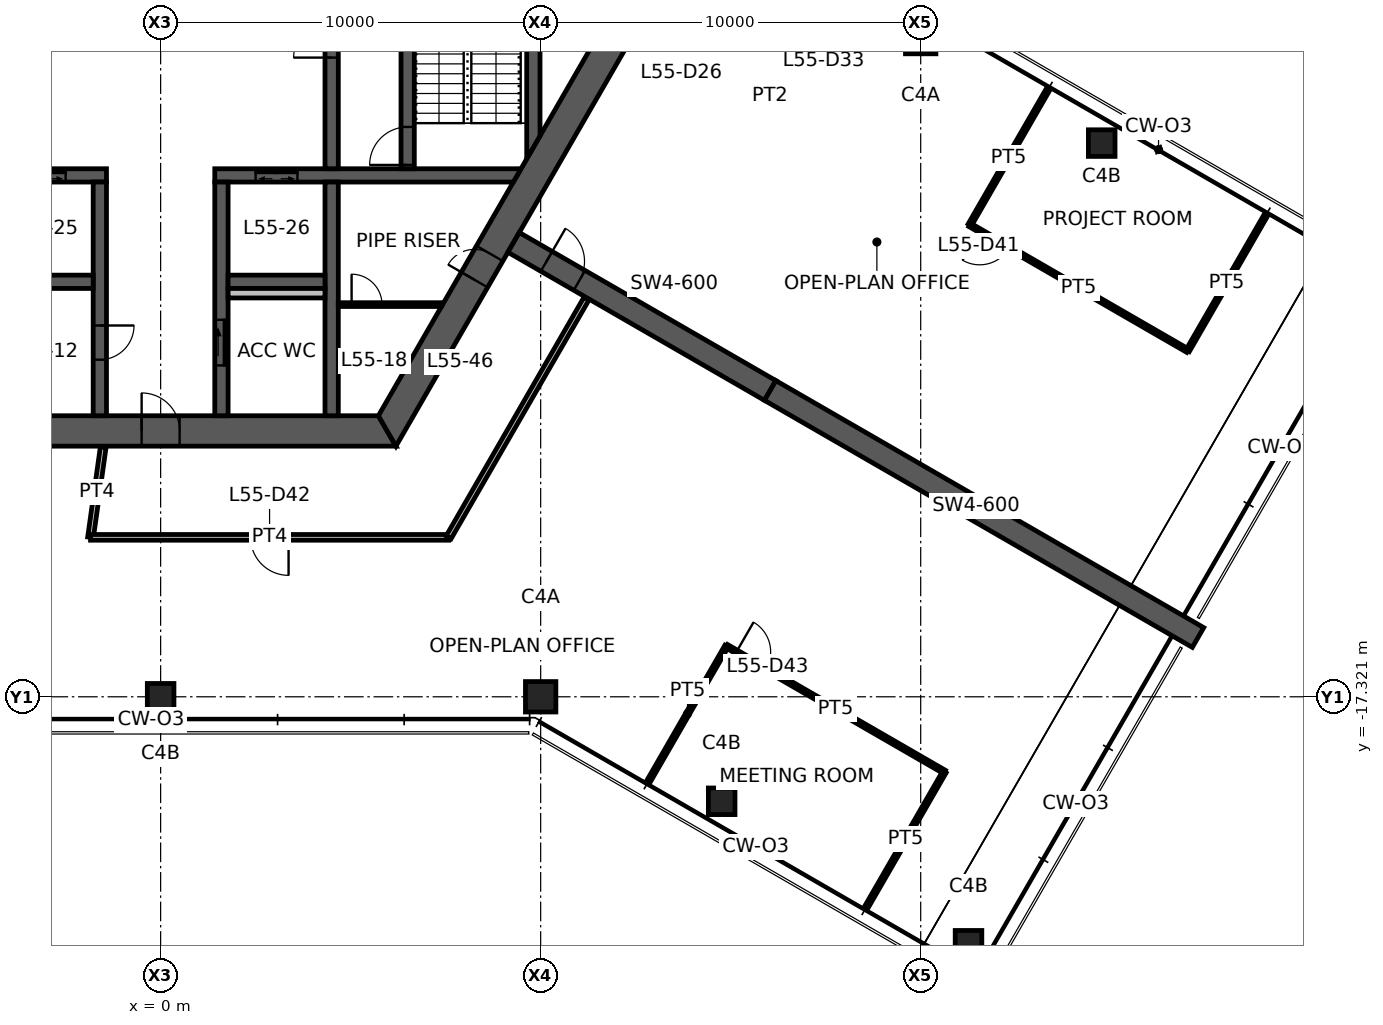
"""IFC4 building model, lengths in metres.
Left out: names, types, materials, properties, quantities, classifications, styles, units other than length and angle.
Written with IfcOpenShell. Run it as: python <this file> out.ifc"""

import sys

from ifc_helpers import new_model, si_unit, direction, frame, frame_2d, origin, origin_2d, place, context, subcontext, project, spatial, polyline, rectangle, hollow_rectangle, outline, extrude, element, fill, save


model = new_model("IFC4")
c1 = context("Model", 3, precision=1e-05, world=origin(), true_north=direction((0.0, 1.0)))
c2 = subcontext(c1, "Body", "Model", "MODEL_VIEW")
j1 = project(units=[si_unit("LENGTHUNIT", "METRE"), si_unit("PLANEANGLEUNIT", "RADIAN")], contexts=[c1])
p1 = place(None, origin())
s1 = spatial("IfcSite", under=j1, at=p1, CompositionType="ELEMENT")
p2 = place(p1, origin())
s2 = spatial("IfcBuilding", under=s1, at=p2, CompositionType="ELEMENT")
p3 = place(p2, frame((0.0, 0.0, 220.6)))
s3 = spatial("IfcBuildingStorey", under=s2, at=p3, CompositionType="ELEMENT", Elevation=220.6)
for number, where, z_axis, x_axis in (
    (1, (20.0, 0.0, 0.0), (0.0, 0.0, 1.0), (1.0, 0.0, 0.0)),
    (2, (10.0, -17.321, 0.0), (0.0, 0.0, 1.0), (1.0, 0.0, 0.0)),
):
    element("IfcColumn", number, at=place(p3, frame(where, z_axis=z_axis, x_axis=x_axis)), inside=s3, PredefinedType="COLUMN", context=c2, shape_type="SweptSolid", body=[
        extrude(hollow_rectangle(XDim=0.8, YDim=0.8, WallThickness=0.04, at=origin_2d()), origin(), (0.0, 0.0, 1.0), 3.9),
    ])
for number, where, z_axis, x_axis in (
    (3, (0.0, -17.321, 0.0), (0.0, 0.0, 1.0), (1.0, 0.0, 0.0)),
    (4, (14.763, -20.071, 0.0), (0.0, 0.0, 1.0), (1.0, 0.0, 0.0)),
    (5, (21.258, -23.821, 0.0), (0.0, 0.0, 1.0), (1.0, 0.0, 0.0)),
    (6, (24.763, -2.75, 0.0), (0.0, 0.0, 1.0), (1.0, 0.0, 0.0)),
):
    element("IfcColumn", number, at=place(p3, frame(where, z_axis=z_axis, x_axis=x_axis)), inside=s3, PredefinedType="COLUMN", context=c2, shape_type="SweptSolid", body=[
        extrude(hollow_rectangle(XDim=0.7, YDim=0.7, WallThickness=0.032, at=origin_2d()), origin(), (0.0, 0.0, 1.0), 3.9),
    ])
p4 = place(p3, frame((-5.961, -10.325, 0.0), z_axis=(0.0, 0.0, 1.0), x_axis=(1.0, 0.0, 0.0)))
e7 = element("IfcWall", 7, at=p4, inside=s3, PredefinedType="SHEAR", context=c2, shape_type="SweptSolid", body=[
    extrude(outline(polyline([(-0.231, -0.4), (5.461, -0.4), (6.461, -0.4), (12.153, -0.4), (11.691, 0.4), (6.461, 0.4), (5.461, 0.4), (0.231, 0.4), (-0.231, -0.4)])), origin(), (0.0, 0.0, 1.0), 3.9),
])
p5 = place(p4, frame((5.461, 0.0, 0.0)))
e8 = element("IfcOpeningElement", 8, at=p5, cuts=e7, PredefinedType="OPENING", context=c2, shape_type="SweptSolid", body=[
    extrude(rectangle(XDim=1.0, YDim=2.1, at=frame_2d((0.5, 1.05))), frame((0.0, 0.41, 0.0), z_axis=(0.0, -1.0, 0.0), x_axis=(1.0, 0.0, 0.0)), (0.0, 0.0, 1.0), 0.82),
])
p6 = place(p3, frame((5.961, -10.325, 0.0), z_axis=(0.0, 0.0, 1.0), x_axis=(0.500004296715, 0.866022923061, 0.0)))
e9 = element("IfcWall", 9, at=p6, inside=s3, PredefinedType="SHEAR", context=c2, shape_type="SweptSolid", body=[
    extrude(outline(polyline([(-0.231, -0.4), (4.594, -0.4), (5.394, -0.4), (12.153, -0.4), (11.691, 0.4), (5.394, 0.4), (4.594, 0.4), (0.231, 0.4), (-0.231, -0.4)])), origin(), (0.0, 0.0, 1.0), 3.9),
])
p7 = place(p6, frame((4.594, 0.0, 0.0)))
e10 = element("IfcOpeningElement", 10, at=p7, cuts=e9, PredefinedType="OPENING", context=c2, shape_type="SweptSolid", body=[
    extrude(rectangle(XDim=0.8, YDim=2.1, at=frame_2d((0.4, 1.05))), frame((0.0, 0.41, 0.0), z_axis=(0.0, -1.0, 0.0), x_axis=(1.0, 0.0, 0.0)), (0.0, 0.0, 1.0), 0.82),
])
p8 = place(p3, frame((9.288, -5.363, 0.0), z_axis=(0.0, 0.0, 1.0), x_axis=(0.866031736626, -0.499989031036, 0.0)))
e11 = element("IfcWall", 11, at=p8, inside=s3, PredefinedType="SHEAR", context=c2, shape_type="SweptSolid", body=[
    extrude(rectangle(XDim=7.796, YDim=0.6, at=frame_2d((3.898, 0.0))), origin(), (0.0, 0.0, 1.0), 3.9),
])
p9 = place(p8, frame((1.0, 0.0, 0.0)))
e12 = element("IfcOpeningElement", 12, at=p9, cuts=e11, PredefinedType="OPENING", context=c2, shape_type="SweptSolid", body=[
    extrude(rectangle(XDim=1.0, YDim=2.1, at=frame_2d((0.5, 1.05))), frame((0.0, 0.31, 0.0), z_axis=(0.0, -1.0, 0.0), x_axis=(1.0, 0.0, 0.0)), (0.0, 0.0, 1.0), 0.62),
])
p10 = place(p3, frame((16.039, -9.26, 0.0), z_axis=(0.0, 0.0, 1.0), x_axis=(0.866024837091, -0.50000098154, 0.0)))
e13 = element("IfcWall", 13, at=p10, inside=s3, PredefinedType="SHEAR", context=c2, shape_type="SweptSolid", body=[
    extrude(rectangle(XDim=13.0, YDim=0.6, at=frame_2d((6.5, 0.0))), origin(), (0.0, 0.0, 1.0), 3.9),
])
p11 = place(p3, frame((-9.382, -3.6, 0.0), z_axis=(0.0, 0.0, 1.0), x_axis=(1.0, 0.0, 0.0)))
e14 = element("IfcWall", 14, at=p11, inside=s3, PredefinedType="SHEAR", context=c2, shape_type="SweptSolid", body=[
    extrude(outline(polyline([(0.101, -0.175), (3.232, -0.175), (4.532, -0.175), (5.782, -0.175), (6.882, -0.175), (7.957, -0.175), (7.957, 0.175), (6.882, 0.175), (5.782, 0.175), (4.532, 0.175), (3.232, 0.175), (-0.101, 0.175), (0.101, -0.175)])), origin(), (0.0, 0.0, 1.0), 3.9),
])
p12 = place(p11, frame((5.782, 0.0, 0.0)))
e15 = element("IfcOpeningElement", 15, at=p12, cuts=e14, PredefinedType="OPENING", context=c2, shape_type="SweptSolid", body=[
    extrude(rectangle(XDim=1.1, YDim=2.1, at=frame_2d((0.55, 1.05))), frame((0.0, 0.185, 0.0), z_axis=(0.0, -1.0, 0.0), x_axis=(1.0, 0.0, 0.0)), (0.0, 0.0, 1.0), 0.37),
])
p13 = place(p11, frame((3.232, 0.0, 0.0)))
e16 = element("IfcOpeningElement", 16, at=p13, cuts=e14, PredefinedType="OPENING", context=c2, shape_type="SweptSolid", body=[
    extrude(rectangle(XDim=1.3, YDim=2.1, at=frame_2d((0.65, 1.05))), frame((0.0, 0.185, 0.0), z_axis=(0.0, -1.0, 0.0), x_axis=(1.0, 0.0, 0.0)), (0.0, 0.0, 1.0), 0.37),
])
p14 = place(p3, frame((1.425, -3.6, 0.0), z_axis=(0.0, 0.0, 1.0), x_axis=(1.0, 0.0, 0.0)))
e17 = element("IfcWall", 17, at=p14, inside=s3, PredefinedType="SHEAR", context=c2, shape_type="SweptSolid", body=[
    extrude(outline(polyline([(0.0, -0.175), (1.075, -0.175), (2.175, -0.175), (7.856, -0.175), (8.058, 0.175), (2.175, 0.175), (1.075, 0.175), (0.0, 0.175), (0.0, -0.175)])), origin(), (0.0, 0.0, 1.0), 3.9),
])
p15 = place(p14, frame((1.075, 0.0, 0.0)))
e18 = element("IfcOpeningElement", 18, at=p15, cuts=e17, PredefinedType="OPENING", context=c2, shape_type="SweptSolid", body=[
    extrude(rectangle(XDim=1.1, YDim=2.1, at=frame_2d((0.55, 1.05))), frame((0.0, 0.185, 0.0), z_axis=(0.0, -1.0, 0.0), x_axis=(1.0, 0.0, 0.0)), (0.0, 0.0, 1.0), 0.37),
])
p16 = place(p3, frame((-1.6, -3.775, 0.0), z_axis=(0.0, 0.0, 1.0), x_axis=(0.0, -1.0, 0.0)))
e19 = element("IfcWall", 19, at=p16, inside=s3, PredefinedType="SHEAR", context=c2, shape_type="SweptSolid", body=[
    extrude(rectangle(XDim=6.15, YDim=0.35, at=frame_2d((3.075, 0.0))), origin(), (0.0, 0.0, 1.0), 3.9),
])
p17 = place(p16, frame((3.775, 0.0, 0.0)))
e20 = element("IfcOpeningElement", 20, at=p17, cuts=e19, PredefinedType="OPENING", context=c2, shape_type="SweptSolid", body=[
    extrude(rectangle(XDim=0.9, YDim=2.1, at=frame_2d((0.45, 1.05))), frame((0.0, 0.185, 0.0), z_axis=(0.0, -1.0, 0.0), x_axis=(1.0, 0.0, 0.0)), (0.0, 0.0, 1.0), 0.37),
])
p18 = place(p3, frame((1.6, -3.775, 0.0), z_axis=(0.0, 0.0, 1.0), x_axis=(0.0, -1.0, 0.0)))
e21 = element("IfcWall", 21, at=p18, inside=s3, PredefinedType="SHEAR", context=c2, shape_type="SweptSolid", body=[
    extrude(rectangle(XDim=6.15, YDim=0.35, at=frame_2d((3.075, 0.0))), origin(), (0.0, 0.0, 1.0), 3.9),
])
p19 = place(p18, frame((3.625, 0.0, 0.0)))
e22 = element("IfcOpeningElement", 22, at=p19, cuts=e21, PredefinedType="OPENING", context=c2, shape_type="SweptSolid", body=[
    extrude(rectangle(XDim=1.2, YDim=2.1, at=frame_2d((0.6, 1.05))), frame((0.0, 0.185, 0.0), z_axis=(0.0, -1.0, 0.0), x_axis=(1.0, 0.0, 0.0)), (0.0, 0.0, 1.0), 0.37),
])
p20 = place(p3, frame((4.5, -3.425, 0.0), z_axis=(0.0, 0.0, 1.0), x_axis=(0.0, 1.0, 0.0)))
e23 = element("IfcWall", 23, at=p20, inside=s3, PredefinedType="SHEAR", context=c2, shape_type="SweptSolid", body=[
    extrude(rectangle(XDim=6.85, YDim=0.35, at=frame_2d((3.425, 0.0))), origin(), (0.0, 0.0, 1.0), 3.9),
])
p21 = place(p20, frame((2.925, 0.0, 0.0)))
e24 = element("IfcOpeningElement", 24, at=p21, cuts=e23, PredefinedType="OPENING", context=c2, shape_type="SweptSolid", body=[
    extrude(rectangle(XDim=1.0, YDim=2.1, at=frame_2d((0.5, 1.05))), frame((0.0, 0.185, 0.0), z_axis=(0.0, -1.0, 0.0), x_axis=(1.0, 0.0, 0.0)), (0.0, 0.0, 1.0), 0.37),
])
p22 = place(p3, frame((6.5, -3.425, 0.0), z_axis=(0.0, 0.0, 1.0), x_axis=(0.0, 1.0, 0.0)))
e25 = element("IfcWall", 25, at=p22, inside=s3, PredefinedType="SHEAR", context=c2, shape_type="SweptSolid", body=[
    extrude(rectangle(XDim=6.85, YDim=0.35, at=frame_2d((3.425, 0.0))), origin(), (0.0, 0.0, 1.0), 3.9),
])
p23 = place(p22, frame((0.1, 0.0, 0.0)))
e26 = element("IfcOpeningElement", 26, at=p23, cuts=e25, PredefinedType="OPENING", context=c2, shape_type="SweptSolid", body=[
    extrude(rectangle(XDim=1.0, YDim=2.1, at=frame_2d((0.5, 1.05))), frame((0.0, 0.185, 0.0), z_axis=(0.0, -1.0, 0.0), x_axis=(1.0, 0.0, 0.0)), (0.0, 0.0, 1.0), 0.37),
])
p24 = place(p3, frame((4.5, -3.775, 0.0), z_axis=(0.0, 0.0, 1.0), x_axis=(0.0, -1.0, 0.0)))
e27 = element("IfcWall", 27, at=p24, inside=s3, PredefinedType="SHEAR", context=c2, shape_type="SweptSolid", body=[
    extrude(rectangle(XDim=6.15, YDim=0.35, at=frame_2d((3.075, 0.0))), origin(), (0.0, 0.0, 1.0), 3.9),
])
for number, where, z_axis, x_axis in (
    (28, (-4.325, -6.4, 0.0), (0.0, 0.0, 1.0), (1.0, 0.0, 0.0)),
    (29, (1.775, -6.4, 0.0), (0.0, 0.0, 1.0), (1.0, 0.0, 0.0)),
):
    element("IfcWall", number, at=place(p3, frame(where, z_axis=z_axis, x_axis=x_axis)), inside=s3, PredefinedType="SHEAR", context=c2, shape_type="SweptSolid", body=[
        extrude(rectangle(XDim=2.55, YDim=0.35, at=frame_2d((1.275, 0.0))), origin(), (0.0, 0.0, 1.0), 3.9),
    ])
p25 = place(p3, frame((9.808, -2.862, 0.0), z_axis=(0.0, 0.0, 1.0), x_axis=(0.0, 1.0, 0.0)))
e30 = element("IfcWall", 30, at=p25, inside=s3, PredefinedType="SHEAR", context=c2, shape_type="SweptSolid", body=[
    extrude(outline(polyline([(0.303, -0.175), (5.421, -0.175), (6.028, 0.175), (-0.303, 0.175), (0.303, -0.175)])), origin(), (0.0, 0.0, 1.0), 3.9),
])
p26 = place(p3, frame((1.775, -6.7, 0.0), z_axis=(0.0, 0.0, 1.0), x_axis=(1.0, 0.0, 0.0)))
e31 = element("IfcWall", 31, at=p26, inside=s3, PredefinedType="PLUMBINGWALL", context=c2, shape_type="SweptSolid", body=[
    extrude(rectangle(XDim=2.55, YDim=0.25, at=frame_2d((1.275, 0.0))), origin(), (0.0, 0.0, 1.0), 3.9),
])
p27 = place(p3, frame((4.675, -7.0, 0.0), z_axis=(0.0, 0.0, 1.0), x_axis=(1.0, 0.0, 0.0)))
e32 = element("IfcWall", 32, at=p27, inside=s3, PredefinedType="PARTITIONING", context=c2, shape_type="SweptSolid", body=[
    extrude(outline(polyline([(0.0, -0.05), (0.35, -0.05), (1.15, -0.05), (2.715, -0.05), (2.744, 0.0), (2.75, 0.05), (1.15, 0.05), (0.35, 0.05), (0.0, 0.05), (0.0, -0.05)])), origin(), (0.0, 0.0, 1.0), 2.95),
])
p28 = place(p27, frame((0.35, 0.0, 0.0)))
e33 = element("IfcOpeningElement", 33, at=p28, cuts=e32, PredefinedType="OPENING", context=c2, shape_type="SweptSolid", body=[
    extrude(rectangle(XDim=0.8, YDim=2.1, at=frame_2d((0.4, 1.05))), frame((0.0, 0.06, 0.0), z_axis=(0.0, -1.0, 0.0), x_axis=(1.0, 0.0, 0.0)), (0.0, 0.0, 1.0), 0.12),
])
p29 = place(p3, frame((21.292, -4.903, 0.0), z_axis=(0.0, 0.0, 1.0), x_axis=(0.500000428765, 0.866025156237, 0.0)))
e34 = element("IfcWall", 34, at=p29, inside=s3, PredefinedType="PARTITIONING", context=c2, shape_type="SweptSolid", body=[
    extrude(rectangle(XDim=4.08, YDim=0.1, at=frame_2d((2.04, 0.0))), origin(), (0.0, 0.0, 1.0), 2.95),
])
p30 = place(p3, frame((27.025, -8.213, 0.0), z_axis=(0.0, 0.0, 1.0), x_axis=(-0.866021597574, 0.500006592492, 0.0)))
e35 = element("IfcWall", 35, at=p30, inside=s3, PredefinedType="PARTITIONING", context=c2, shape_type="SweptSolid", body=[
    extrude(rectangle(XDim=6.62, YDim=0.1, at=frame_2d((3.31, 0.0))), origin(), (0.0, 0.0, 1.0), 2.95),
])
p31 = place(p30, frame((5.42, 0.0, 0.0)))
e36 = element("IfcOpeningElement", 36, at=p31, cuts=e35, PredefinedType="OPENING", context=c2, shape_type="SweptSolid", body=[
    extrude(rectangle(XDim=0.9, YDim=2.1, at=frame_2d((0.45, 1.05))), frame((0.0, 0.06, 0.0), z_axis=(0.0, -1.0, 0.0), x_axis=(1.0, 0.0, 0.0)), (0.0, 0.0, 1.0), 0.12),
])
p32 = place(p3, frame((29.08, -4.653, 0.0), z_axis=(0.0, 0.0, 1.0), x_axis=(-0.500010383074, -0.866019409031, 0.0)))
e37 = element("IfcWall", 37, at=p32, inside=s3, PredefinedType="PARTITIONING", context=c2, shape_type="SweptSolid", body=[
    extrude(rectangle(XDim=4.11, YDim=0.1, at=frame_2d((2.055, 0.0))), origin(), (0.0, 0.0, 1.0), 2.95),
])
p33 = place(p3, frame((-1.844, -13.125, 0.0), z_axis=(0.0, 0.0, 1.0), x_axis=(0.139173892267, 0.99026795753, 0.0)))
e38 = element("IfcWall", 38, at=p33, inside=s3, PredefinedType="PARTITIONING", context=c2, shape_type="SweptSolid", body=[
    extrude(rectangle(XDim=2.403, YDim=0.15, at=frame_2d((1.202, 0.0))), origin(), (0.0, 0.0, 1.0), 2.95),
])
p34 = place(p3, frame((7.578, -13.125, 0.0), z_axis=(0.0, 0.0, 1.0), x_axis=(-1.0, 0.0, 0.0)))
e39 = element("IfcWall", 39, at=p34, inside=s3, PredefinedType="PARTITIONING", context=c2, shape_type="SweptSolid", body=[
    extrude(rectangle(XDim=9.422, YDim=0.15, at=frame_2d((4.711, 0.0))), origin(), (0.0, 0.0, 1.0), 2.95),
])
p35 = place(p34, frame((4.211, 0.0, 0.0)))
e40 = element("IfcOpeningElement", 40, at=p35, cuts=e39, PredefinedType="OPENING", context=c2, shape_type="SweptSolid", body=[
    extrude(rectangle(XDim=1.0, YDim=2.1, at=frame_2d((0.5, 1.05))), frame((0.0, 0.085, 0.0), z_axis=(0.0, -1.0, 0.0), x_axis=(1.0, 0.0, 0.0)), (0.0, 0.0, 1.0), 0.17),
])
p36 = place(p3, frame((11.207, -6.84, 0.0), z_axis=(0.0, 0.0, 1.0), x_axis=(-0.500002959843, -0.866023694911, 0.0)))
e41 = element("IfcWall", 41, at=p36, inside=s3, PredefinedType="PARTITIONING", context=c2, shape_type="SweptSolid", body=[
    extrude(rectangle(XDim=7.258, YDim=0.15, at=frame_2d((3.629, 0.0))), origin(), (0.0, 0.0, 1.0), 2.95),
])
p37 = place(p3, frame((12.837, -19.548, 0.0), z_axis=(0.0, 0.0, 1.0), x_axis=(0.499965833383, 0.866045128991, 0.0)))
e42 = element("IfcWall", 42, at=p37, inside=s3, PredefinedType="PARTITIONING", context=c2, shape_type="SweptSolid", body=[
    extrude(rectangle(XDim=4.11, YDim=0.1, at=frame_2d((2.055, 0.0))), origin(), (0.0, 0.0, 1.0), 2.95),
])
p38 = place(p3, frame((14.892, -15.988, 0.0), z_axis=(0.0, 0.0, 1.0), x_axis=(0.866030817826, -0.499990622488, 0.0)))
e43 = element("IfcWall", 43, at=p38, inside=s3, PredefinedType="PARTITIONING", context=c2, shape_type="SweptSolid", body=[
    extrude(rectangle(XDim=6.62, YDim=0.1, at=frame_2d((3.31, 0.0))), origin(), (0.0, 0.0, 1.0), 2.95),
])
p39 = place(p38, frame((0.3, 0.0, 0.0)))
e44 = element("IfcOpeningElement", 44, at=p39, cuts=e43, PredefinedType="OPENING", context=c2, shape_type="SweptSolid", body=[
    extrude(rectangle(XDim=0.9, YDim=2.1, at=frame_2d((0.45, 1.05))), frame((0.0, 0.06, 0.0), z_axis=(0.0, -1.0, 0.0), x_axis=(1.0, 0.0, 0.0)), (0.0, 0.0, 1.0), 0.12),
])
p40 = place(p3, frame((20.625, -19.298, 0.0), z_axis=(0.0, 0.0, 1.0), x_axis=(-0.500000428765, -0.866025156237, 0.0)))
e45 = element("IfcWall", 45, at=p40, inside=s3, PredefinedType="PARTITIONING", context=c2, shape_type="SweptSolid", body=[
    extrude(rectangle(XDim=4.08, YDim=0.1, at=frame_2d((2.04, 0.0))), origin(), (0.0, 0.0, 1.0), 2.95),
])
p41 = place(p5, origin())
e46 = element("IfcDoor", 46, at=p41, inside=s3, OperationType="SINGLE_SWING_LEFT", PredefinedType="DOOR", context=c2, shape_type="SweptSolid", body=[
    extrude(rectangle(XDim=1.0, YDim=2.1, at=frame_2d((0.5, 1.05))), frame((0.0, 0.025, 0.0), z_axis=(0.0, -1.0, 0.0), x_axis=(1.0, 0.0, 0.0)), (0.0, 0.0, 1.0), 0.05),
])
fill(e8, e46)
p42 = place(p7, origin())
e47 = element("IfcDoor", 47, at=p42, inside=s3, OperationType="SINGLE_SWING_LEFT", PredefinedType="DOOR", context=c2, shape_type="SweptSolid", body=[
    extrude(rectangle(XDim=0.8, YDim=2.1, at=frame_2d((0.4, 1.05))), frame((0.0, 0.025, 0.0), z_axis=(0.0, -1.0, 0.0), x_axis=(1.0, 0.0, 0.0)), (0.0, 0.0, 1.0), 0.05),
])
fill(e10, e47)
p43 = place(p21, origin())
e48 = element("IfcDoor", 48, at=p43, inside=s3, OperationType="SINGLE_SWING_LEFT", PredefinedType="DOOR", context=c2, shape_type="SweptSolid", body=[
    extrude(rectangle(XDim=1.0, YDim=2.1, at=frame_2d((0.5, 1.05))), frame((0.0, 0.025, 0.0), z_axis=(0.0, -1.0, 0.0), x_axis=(1.0, 0.0, 0.0)), (0.0, 0.0, 1.0), 0.05),
])
fill(e24, e48)
p44 = place(p23, origin())
e49 = element("IfcDoor", 49, at=p44, inside=s3, OperationType="SINGLE_SWING_LEFT", PredefinedType="DOOR", context=c2, shape_type="SweptSolid", body=[
    extrude(rectangle(XDim=1.0, YDim=2.1, at=frame_2d((0.5, 1.05))), frame((0.0, 0.025, 0.0), z_axis=(0.0, -1.0, 0.0), x_axis=(1.0, 0.0, 0.0)), (0.0, 0.0, 1.0), 0.05),
])
fill(e26, e49)
p45 = place(p19, origin())
e50 = element("IfcDoor", 50, at=p45, inside=s3, OperationType="SLIDING_TO_LEFT", PredefinedType="DOOR", context=c2, shape_type="SweptSolid", body=[
    extrude(rectangle(XDim=1.2, YDim=2.1, at=frame_2d((0.6, 1.05))), frame((0.0, 0.025, 0.0), z_axis=(0.0, -1.0, 0.0), x_axis=(1.0, 0.0, 0.0)), (0.0, 0.0, 1.0), 0.05),
])
fill(e22, e50)
p46 = place(p17, origin())
e51 = element("IfcDoor", 51, at=p46, inside=s3, OperationType="SINGLE_SWING_LEFT", PredefinedType="DOOR", context=c2, shape_type="SweptSolid", body=[
    extrude(rectangle(XDim=0.9, YDim=2.1, at=frame_2d((0.45, 1.05))), frame((0.0, 0.025, 0.0), z_axis=(0.0, -1.0, 0.0), x_axis=(1.0, 0.0, 0.0)), (0.0, 0.0, 1.0), 0.05),
])
fill(e20, e51)
p47 = place(p9, origin())
e52 = element("IfcDoor", 52, at=p47, inside=s3, OperationType="SINGLE_SWING_LEFT", PredefinedType="DOOR", context=c2, shape_type="SweptSolid", body=[
    extrude(rectangle(XDim=1.0, YDim=2.1, at=frame_2d((0.5, 1.05))), frame((0.0, 0.025, 0.0), z_axis=(0.0, -1.0, 0.0), x_axis=(1.0, 0.0, 0.0)), (0.0, 0.0, 1.0), 0.05),
])
fill(e12, e52)
p48 = place(p28, origin())
e53 = element("IfcDoor", 53, at=p48, inside=s3, OperationType="SINGLE_SWING_LEFT", PredefinedType="DOOR", context=c2, shape_type="SweptSolid", body=[
    extrude(rectangle(XDim=0.8, YDim=2.1, at=frame_2d((0.4, 1.05))), frame((0.0, 0.025, 0.0), z_axis=(0.0, -1.0, 0.0), x_axis=(1.0, 0.0, 0.0)), (0.0, 0.0, 1.0), 0.05),
])
fill(e33, e53)
p49 = place(p31, origin())
e54 = element("IfcDoor", 54, at=p49, inside=s3, OperationType="SINGLE_SWING_RIGHT", PredefinedType="DOOR", context=c2, shape_type="SweptSolid", body=[
    extrude(rectangle(XDim=0.9, YDim=2.1, at=frame_2d((0.45, 1.05))), frame((0.0, 0.025, 0.0), z_axis=(0.0, -1.0, 0.0), x_axis=(1.0, 0.0, 0.0)), (0.0, 0.0, 1.0), 0.05),
])
fill(e36, e54)
p50 = place(p35, origin())
e55 = element("IfcDoor", 55, at=p50, inside=s3, OperationType="SINGLE_SWING_LEFT", PredefinedType="DOOR", context=c2, shape_type="SweptSolid", body=[
    extrude(rectangle(XDim=1.0, YDim=2.1, at=frame_2d((0.5, 1.05))), frame((0.0, 0.025, 0.0), z_axis=(0.0, -1.0, 0.0), x_axis=(1.0, 0.0, 0.0)), (0.0, 0.0, 1.0), 0.05),
])
fill(e40, e55)
p51 = place(p39, origin())
e56 = element("IfcDoor", 56, at=p51, inside=s3, OperationType="SINGLE_SWING_LEFT", PredefinedType="DOOR", context=c2, shape_type="SweptSolid", body=[
    extrude(rectangle(XDim=0.9, YDim=2.1, at=frame_2d((0.45, 1.05))), frame((0.0, 0.025, 0.0), z_axis=(0.0, -1.0, 0.0), x_axis=(1.0, 0.0, 0.0)), (0.0, 0.0, 1.0), 0.05),
])
fill(e44, e56)
p52 = place(p15, origin())
e57 = element("IfcDoor", 57, at=p52, inside=s3, OperationType="DOUBLE_DOOR_SLIDING", PredefinedType="DOOR", context=c2, shape_type="SweptSolid", body=[
    extrude(rectangle(XDim=1.1, YDim=2.1, at=frame_2d((0.55, 1.05))), frame((0.0, 0.025, 0.0), z_axis=(0.0, -1.0, 0.0), x_axis=(1.0, 0.0, 0.0)), (0.0, 0.0, 1.0), 0.05),
])
fill(e18, e57)
p53 = place(p12, origin())
e58 = element("IfcDoor", 58, at=p53, inside=s3, OperationType="DOUBLE_DOOR_SLIDING", PredefinedType="DOOR", context=c2, shape_type="SweptSolid", body=[
    extrude(rectangle(XDim=1.1, YDim=2.1, at=frame_2d((0.55, 1.05))), frame((0.0, 0.025, 0.0), z_axis=(0.0, -1.0, 0.0), x_axis=(1.0, 0.0, 0.0)), (0.0, 0.0, 1.0), 0.05),
])
fill(e15, e58)
save(model, sys.argv[1])
